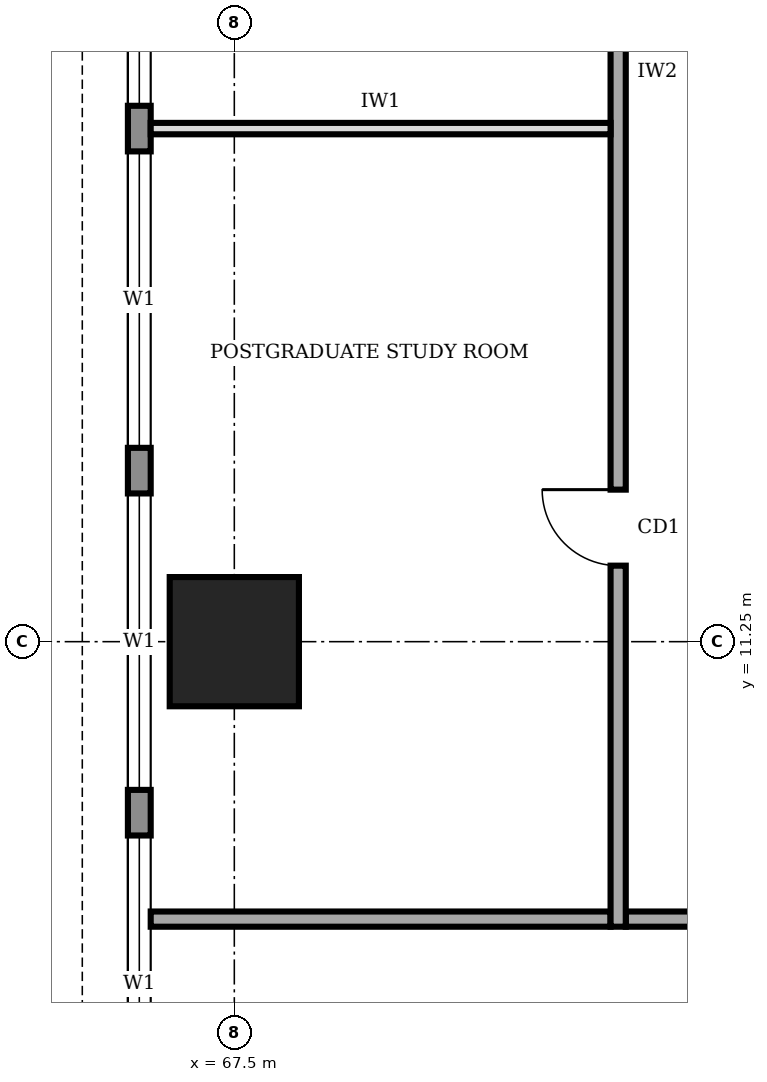
"""IFC4 building model, lengths in metres.
Left out: names, types, materials, properties, quantities, classifications, styles, units other than length and angle.
Written with IfcOpenShell. Run it as: python <this file> out.ifc"""

import sys

from ifc_helpers import new_model, si_unit, direction, frame, frame_2d, origin, origin_2d, place, context, subcontext, project, spatial, rectangle, extrude, element, fill, save


model = new_model("IFC4")
c1 = context("Model", 3, precision=1e-05, world=origin(), true_north=direction((0.0, 1.0)))
c2 = subcontext(c1, "Body", "Model", "MODEL_VIEW")
j1 = project(units=[si_unit("LENGTHUNIT", "METRE"), si_unit("PLANEANGLEUNIT", "RADIAN")], contexts=[c1])
p1 = place(None, origin())
s1 = spatial("IfcSite", under=j1, at=p1, CompositionType="ELEMENT")
p2 = place(p1, origin())
s2 = spatial("IfcBuilding", under=s1, at=p2, CompositionType="ELEMENT")
p3 = place(p2, frame((0.0, 0.0, 205.0)))
s3 = spatial("IfcBuildingStorey", under=s2, at=p3, CompositionType="ELEMENT", Elevation=205.0)
p4 = place(p3, frame((67.5, 11.25, 0.0), z_axis=(0.0, 0.0, 1.0), x_axis=(1.0, 0.0, 0.0)))
e1 = element("IfcColumn", 1, at=p4, inside=s3, PredefinedType="COLUMN", context=c2, shape_type="SweptSolid", body=[
    extrude(rectangle(XDim=1.7, YDim=1.7, at=origin_2d()), origin(), (0.0, 0.0, 1.0), 4.0),
])
p5 = place(p3, frame((66.25, 37.18, 0.0), z_axis=(0.0, 0.0, 1.0), x_axis=(0.0, -1.0, 0.0)))
e2 = element("IfcWall", 2, at=p5, inside=s3, PredefinedType="STANDARD", context=c2, shape_type="SweptSolid", body=[
    extrude(rectangle(XDim=33.86, YDim=0.3, at=frame_2d((16.93, 0.0))), origin(), (0.0, 0.0, 1.0), 3.75),
])
p6 = place(p5, frame((28.48, 0.0, 0.9)))
e3 = element("IfcOpeningElement", 3, at=p6, cuts=e2, PredefinedType="OPENING", context=c2, shape_type="SweptSolid", body=[
    extrude(rectangle(XDim=3.9, YDim=2.2, at=frame_2d((1.95, 1.1))), frame((0.0, 0.16, 0.0), z_axis=(0.0, -1.0, 0.0), x_axis=(1.0, 0.0, 0.0)), (0.0, 0.0, 1.0), 0.32),
])
p7 = place(p5, frame((23.98, 0.0, 0.9)))
e4 = element("IfcOpeningElement", 4, at=p7, cuts=e2, PredefinedType="OPENING", context=c2, shape_type="SweptSolid", body=[
    extrude(rectangle(XDim=3.9, YDim=2.2, at=frame_2d((1.95, 1.1))), frame((0.0, 0.16, 0.0), z_axis=(0.0, -1.0, 0.0), x_axis=(1.0, 0.0, 0.0)), (0.0, 0.0, 1.0), 0.32),
])
p8 = place(p5, frame((19.48, 0.0, 0.9)))
e5 = element("IfcOpeningElement", 5, at=p8, cuts=e2, PredefinedType="OPENING", context=c2, shape_type="SweptSolid", body=[
    extrude(rectangle(XDim=3.9, YDim=2.2, at=frame_2d((1.95, 1.1))), frame((0.0, 0.16, 0.0), z_axis=(0.0, -1.0, 0.0), x_axis=(1.0, 0.0, 0.0)), (0.0, 0.0, 1.0), 0.32),
])
p9 = place(p5, frame((14.98, 0.0, 0.9)))
e6 = element("IfcOpeningElement", 6, at=p9, cuts=e2, PredefinedType="OPENING", context=c2, shape_type="SweptSolid", body=[
    extrude(rectangle(XDim=3.9, YDim=2.2, at=frame_2d((1.95, 1.1))), frame((0.0, 0.16, 0.0), z_axis=(0.0, -1.0, 0.0), x_axis=(1.0, 0.0, 0.0)), (0.0, 0.0, 1.0), 0.32),
])
p10 = place(p5, frame((10.48, 0.0, 0.9)))
e7 = element("IfcOpeningElement", 7, at=p10, cuts=e2, PredefinedType="OPENING", context=c2, shape_type="SweptSolid", body=[
    extrude(rectangle(XDim=3.9, YDim=2.2, at=frame_2d((1.95, 1.1))), frame((0.0, 0.16, 0.0), z_axis=(0.0, -1.0, 0.0), x_axis=(1.0, 0.0, 0.0)), (0.0, 0.0, 1.0), 0.32),
])
p11 = place(p5, frame((5.98, 0.0, 0.9)))
e8 = element("IfcOpeningElement", 8, at=p11, cuts=e2, PredefinedType="OPENING", context=c2, shape_type="SweptSolid", body=[
    extrude(rectangle(XDim=3.9, YDim=2.2, at=frame_2d((1.95, 1.1))), frame((0.0, 0.16, 0.0), z_axis=(0.0, -1.0, 0.0), x_axis=(1.0, 0.0, 0.0)), (0.0, 0.0, 1.0), 0.32),
])
p12 = place(p5, frame((1.48, 0.0, 0.9)))
e9 = element("IfcOpeningElement", 9, at=p12, cuts=e2, PredefinedType="OPENING", context=c2, shape_type="SweptSolid", body=[
    extrude(rectangle(XDim=3.9, YDim=2.2, at=frame_2d((1.95, 1.1))), frame((0.0, 0.16, 0.0), z_axis=(0.0, -1.0, 0.0), x_axis=(1.0, 0.0, 0.0)), (0.0, 0.0, 1.0), 0.32),
])
p13 = place(p3, frame((72.65, 7.6, 0.0), z_axis=(0.0, 0.0, 1.0), x_axis=(1.0, 0.0, 0.0)))
e10 = element("IfcWall", 10, at=p13, inside=s3, PredefinedType="SOLIDWALL", context=c2, shape_type="SweptSolid", body=[
    extrude(rectangle(XDim=16.9, YDim=0.2, at=frame_2d((8.45, 0.0))), origin(), (0.0, 0.0, 1.0), 3.75),
])
p14 = place(p13, frame((7.45, 0.0, 0.0)))
e11 = element("IfcOpeningElement", 11, at=p14, cuts=e10, PredefinedType="OPENING", context=c2, shape_type="SweptSolid", body=[
    extrude(rectangle(XDim=1.8, YDim=2.1, at=frame_2d((0.9, 1.05))), frame((0.0, 0.11, 0.0), z_axis=(0.0, -1.0, 0.0), x_axis=(1.0, 0.0, 0.0)), (0.0, 0.0, 1.0), 0.22),
])
p15 = place(p3, frame((72.55, 31.3, 0.0), z_axis=(0.0, 0.0, 1.0), x_axis=(0.0, -1.0, 0.0)))
e12 = element("IfcWall", 12, at=p15, inside=s3, PredefinedType="SOLIDWALL", context=c2, shape_type="SweptSolid", body=[
    extrude(rectangle(XDim=23.8, YDim=0.2, at=frame_2d((11.9, 0.0))), origin(), (0.0, 0.0, 1.0), 3.75),
])
p16 = place(p15, frame((18.05, 0.0, 0.0)))
e13 = element("IfcOpeningElement", 13, at=p16, cuts=e12, PredefinedType="OPENING", context=c2, shape_type="SweptSolid", body=[
    extrude(rectangle(XDim=1.0, YDim=2.1, at=frame_2d((0.5, 1.05))), frame((0.0, 0.11, 0.0), z_axis=(0.0, -1.0, 0.0), x_axis=(1.0, 0.0, 0.0)), (0.0, 0.0, 1.0), 0.22),
])
p17 = place(p15, frame((6.05, 0.0, 0.0)))
e14 = element("IfcOpeningElement", 14, at=p17, cuts=e12, PredefinedType="OPENING", context=c2, shape_type="SweptSolid", body=[
    extrude(rectangle(XDim=1.0, YDim=2.1, at=frame_2d((0.5, 1.05))), frame((0.0, 0.11, 0.0), z_axis=(0.0, -1.0, 0.0), x_axis=(1.0, 0.0, 0.0)), (0.0, 0.0, 1.0), 0.22),
])
p18 = place(p3, frame((66.4, 7.6, 0.0), z_axis=(0.0, 0.0, 1.0), x_axis=(1.0, 0.0, 0.0)))
e15 = element("IfcWall", 15, at=p18, inside=s3, PredefinedType="SOLIDWALL", context=c2, shape_type="SweptSolid", body=[
    extrude(rectangle(XDim=6.05, YDim=0.2, at=frame_2d((3.025, 0.0))), origin(), (0.0, 0.0, 1.0), 3.75),
])
p19 = place(p3, frame((66.4, 18.0, 0.0), z_axis=(0.0, 0.0, 1.0), x_axis=(1.0, 0.0, 0.0)))
e16 = element("IfcWall", 16, at=p19, inside=s3, PredefinedType="PARTITIONING", context=c2, shape_type="SweptSolid", body=[
    extrude(rectangle(XDim=6.05, YDim=0.15, at=frame_2d((3.025, 0.0))), origin(), (0.0, 0.0, 1.0), 3.75),
])
p20 = place(p6, origin())
e17 = element("IfcWindow", 17, at=p20, inside=s3, PartitioningType="SINGLE_PANEL", PredefinedType="WINDOW", context=c2, shape_type="SweptSolid", body=[
    extrude(rectangle(XDim=3.9, YDim=2.2, at=frame_2d((1.95, 1.1))), frame((0.0, 0.03, 0.0), z_axis=(0.0, -1.0, 0.0), x_axis=(1.0, 0.0, 0.0)), (0.0, 0.0, 1.0), 0.06),
])
fill(e3, e17)
p21 = place(p7, origin())
e18 = element("IfcWindow", 18, at=p21, inside=s3, PartitioningType="SINGLE_PANEL", PredefinedType="WINDOW", context=c2, shape_type="SweptSolid", body=[
    extrude(rectangle(XDim=3.9, YDim=2.2, at=frame_2d((1.95, 1.1))), frame((0.0, 0.03, 0.0), z_axis=(0.0, -1.0, 0.0), x_axis=(1.0, 0.0, 0.0)), (0.0, 0.0, 1.0), 0.06),
])
fill(e4, e18)
p22 = place(p8, origin())
e19 = element("IfcWindow", 19, at=p22, inside=s3, PartitioningType="SINGLE_PANEL", PredefinedType="WINDOW", context=c2, shape_type="SweptSolid", body=[
    extrude(rectangle(XDim=3.9, YDim=2.2, at=frame_2d((1.95, 1.1))), frame((0.0, 0.03, 0.0), z_axis=(0.0, -1.0, 0.0), x_axis=(1.0, 0.0, 0.0)), (0.0, 0.0, 1.0), 0.06),
])
fill(e5, e19)
p23 = place(p9, origin())
e20 = element("IfcWindow", 20, at=p23, inside=s3, PartitioningType="SINGLE_PANEL", PredefinedType="WINDOW", context=c2, shape_type="SweptSolid", body=[
    extrude(rectangle(XDim=3.9, YDim=2.2, at=frame_2d((1.95, 1.1))), frame((0.0, 0.03, 0.0), z_axis=(0.0, -1.0, 0.0), x_axis=(1.0, 0.0, 0.0)), (0.0, 0.0, 1.0), 0.06),
])
fill(e6, e20)
p24 = place(p16, frame((1.0, 0.0, 0.0), z_axis=(0.0, 0.0, 1.0), x_axis=(-1.0, 0.0, 0.0)))
e21 = element("IfcDoor", 21, at=p24, inside=s3, OperationType="SINGLE_SWING_RIGHT", PredefinedType="DOOR", context=c2, shape_type="SweptSolid", body=[
    extrude(rectangle(XDim=1.0, YDim=2.1, at=frame_2d((0.5, 1.05))), frame((0.0, 0.025, 0.0), z_axis=(0.0, -1.0, 0.0), x_axis=(1.0, 0.0, 0.0)), (0.0, 0.0, 1.0), 0.05),
])
fill(e13, e21)
save(model, sys.argv[1])
